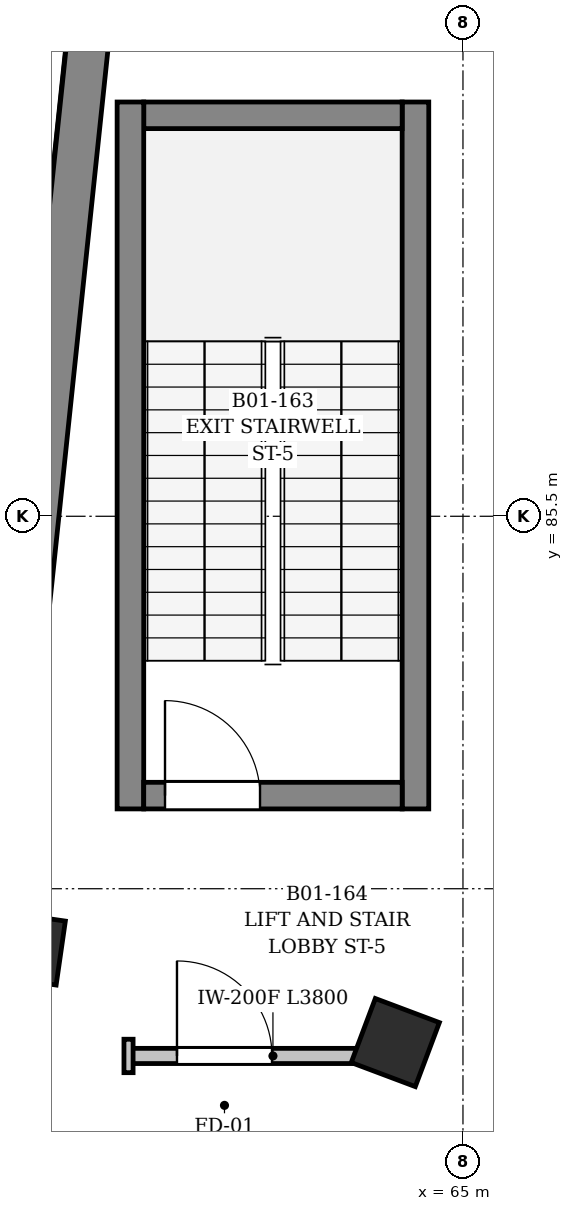
"""IFC4 building model, lengths in metres.
Left out: names, types, materials, properties, quantities, classifications, styles, units other than length and angle.
Written with IfcOpenShell. Run it as: python <this file> out.ifc"""

import sys

from ifc_helpers import new_model, si_unit, direction, frame, frame_2d, origin, origin_2d, place, context, subcontext, project, spatial, rectangle, extrude, element, fill, save


model = new_model("IFC4")
c1 = context("Model", 3, precision=1e-05, world=origin(), true_north=direction((0.0, 1.0)))
c2 = subcontext(c1, "Body", "Model", "MODEL_VIEW")
j1 = project(units=[si_unit("LENGTHUNIT", "METRE"), si_unit("PLANEANGLEUNIT", "RADIAN")], contexts=[c1])
p1 = place(None, origin())
s1 = spatial("IfcSite", under=j1, at=p1, CompositionType="ELEMENT")
p2 = place(p1, origin())
s2 = spatial("IfcBuilding", under=s1, at=p2, CompositionType="ELEMENT")
p3 = place(p2, frame((0.0, 0.0, -5.4)))
s3 = spatial("IfcBuildingStorey", under=s2, at=p3, CompositionType="ELEMENT", Elevation=-5.4)
p4 = place(p3, frame((64.11, 78.576, 0.0), z_axis=(0.0, 0.0, 1.0), x_axis=(0.351841648405, 0.936059535739, 0.0)))
e1 = element("IfcColumn", 1, at=p4, inside=s3, PredefinedType="COLUMN", context=c2, shape_type="SweptSolid", body=[
    extrude(rectangle(XDim=0.9, YDim=0.9, at=origin_2d()), origin(), (0.0, 0.0, 1.0), 5.05),
])
p5 = place(p3, frame((59.288, 79.814, 0.0), z_axis=(0.0, 0.0, 1.0), x_axis=(0.142628933706, 0.989776230908, 0.0)))
e2 = element("IfcColumn", 2, at=p5, inside=s3, PredefinedType="COLUMN", context=c2, shape_type="SweptSolid", body=[
    extrude(rectangle(XDim=0.85, YDim=0.85, at=origin_2d()), origin(), (0.0, 0.0, 1.0), 5.05),
])
p6 = place(p3, frame((60.823, 106.815, 0.0), z_axis=(0.0, 0.0, 1.0), x_axis=(-0.104523755252, -0.994522390189, 0.0)))
e3 = element("IfcWall", 3, at=p6, inside=s3, PredefinedType="USERDEFINED", context=c2, shape_type="SweptSolid", body=[
    extrude(rectangle(XDim=31.411, YDim=0.55, at=frame_2d((15.706, 0.0))), origin(), (0.0, 0.0, 1.0), 5.05),
])
p7 = place(p3, frame((58.355, 75.486, 0.0), z_axis=(0.0, 0.0, 1.0), x_axis=(0.104529232087, 0.994521814562, 0.0)))
e4 = element("IfcWall", 4, at=p7, inside=s3, PredefinedType="USERDEFINED", context=c2, shape_type="SweptSolid", body=[
    extrude(rectangle(XDim=33.416, YDim=0.55, at=frame_2d((16.708, 0.0))), origin(), (0.0, 0.0, 1.0), 5.05),
])
p8 = place(p3, frame((64.375, 81.65, 0.0), z_axis=(0.0, 0.0, 1.0), x_axis=(0.0, 1.0, 0.0)))
e5 = element("IfcWall", 5, at=p8, inside=s3, PredefinedType="SHEAR", context=c2, shape_type="SweptSolid", body=[
    extrude(rectangle(XDim=9.3, YDim=0.35, at=frame_2d((4.65, 0.0))), origin(), (0.0, 0.0, 1.0), 5.05),
])
p9 = place(p3, frame((64.2, 90.775, 0.0), z_axis=(0.0, 0.0, 1.0), x_axis=(-1.0, 0.0, 0.0)))
e6 = element("IfcWall", 6, at=p9, inside=s3, PredefinedType="SHEAR", context=c2, shape_type="SweptSolid", body=[
    extrude(rectangle(XDim=3.4, YDim=0.35, at=frame_2d((1.7, 0.0))), origin(), (0.0, 0.0, 1.0), 5.05),
])
p10 = place(p3, frame((60.625, 90.95, 0.0), z_axis=(0.0, 0.0, 1.0), x_axis=(0.0, -1.0, 0.0)))
e7 = element("IfcWall", 7, at=p10, inside=s3, PredefinedType="SHEAR", context=c2, shape_type="SweptSolid", body=[
    extrude(rectangle(XDim=9.3, YDim=0.35, at=frame_2d((4.65, 0.0))), origin(), (0.0, 0.0, 1.0), 5.05),
])
p11 = place(p3, frame((60.8, 81.825, 0.0), z_axis=(0.0, 0.0, 1.0), x_axis=(1.0, 0.0, 0.0)))
e8 = element("IfcWall", 8, at=p11, inside=s3, PredefinedType="SHEAR", context=c2, shape_type="SweptSolid", body=[
    extrude(rectangle(XDim=3.4, YDim=0.35, at=frame_2d((1.7, 0.0))), origin(), (0.0, 0.0, 1.0), 5.05),
])
p12 = place(p11, frame((0.28, 0.0, 0.0)))
e9 = element("IfcOpeningElement", 9, at=p12, cuts=e8, PredefinedType="OPENING", context=c2, shape_type="SweptSolid", body=[
    extrude(rectangle(XDim=1.25, YDim=2.2, at=frame_2d((0.625, 1.1))), frame((0.0, 0.185, 0.0), z_axis=(0.0, -1.0, 0.0), x_axis=(1.0, 0.0, 0.0)), (0.0, 0.0, 1.0), 0.37),
])
p13 = place(p3, frame((60.6, 78.4, 0.0), z_axis=(0.0, 0.0, 1.0), x_axis=(1.0, 0.0, 0.0)))
e10 = element("IfcWall", 10, at=p13, inside=s3, PredefinedType="PARTITIONING", context=c2, shape_type="SweptSolid", body=[
    extrude(rectangle(XDim=3.8, YDim=0.2, at=frame_2d((1.9, 0.0))), origin(), (0.0, 0.0, 1.0), 4.04),
])
p14 = place(p13, frame((0.637, 0.0, 0.0)))
e11 = element("IfcOpeningElement", 11, at=p14, cuts=e10, PredefinedType="OPENING", context=c2, shape_type="SweptSolid", body=[
    extrude(rectangle(XDim=1.25, YDim=2.2, at=frame_2d((0.625, 1.1))), frame((0.0, 0.11, 0.0), z_axis=(0.0, -1.0, 0.0), x_axis=(1.0, 0.0, 0.0)), (0.0, 0.0, 1.0), 0.22),
])
p15 = place(p3, frame((60.6, 78.18, 0.0), z_axis=(0.0, 0.0, 1.0), x_axis=(0.0, 1.0, 0.0)))
e12 = element("IfcWall", 12, at=p15, inside=s3, PredefinedType="PARTITIONING", context=c2, shape_type="SweptSolid", body=[
    extrude(rectangle(XDim=0.44, YDim=0.12, at=frame_2d((0.22, 0.0))), origin(), (0.0, 0.0, 1.0), 4.34),
])
p16 = place(p12, origin())
e13 = element("IfcDoor", 13, at=p16, inside=s3, OperationType="SINGLE_SWING_LEFT", PredefinedType="DOOR", context=c2, shape_type="SweptSolid", body=[
    extrude(rectangle(XDim=1.25, YDim=2.2, at=frame_2d((0.625, 1.1))), frame((0.0, 0.025, 0.0), z_axis=(0.0, -1.0, 0.0), x_axis=(1.0, 0.0, 0.0)), (0.0, 0.0, 1.0), 0.05),
])
fill(e9, e13)
p17 = place(p14, origin())
e14 = element("IfcDoor", 14, at=p17, inside=s3, OperationType="SINGLE_SWING_LEFT", PredefinedType="DOOR", context=c2, shape_type="SweptSolid", body=[
    extrude(rectangle(XDim=1.25, YDim=2.2, at=frame_2d((0.625, 1.1))), frame((0.0, 0.025, 0.0), z_axis=(0.0, -1.0, 0.0), x_axis=(1.0, 0.0, 0.0)), (0.0, 0.0, 1.0), 0.05),
])
fill(e11, e14)
save(model, sys.argv[1])
